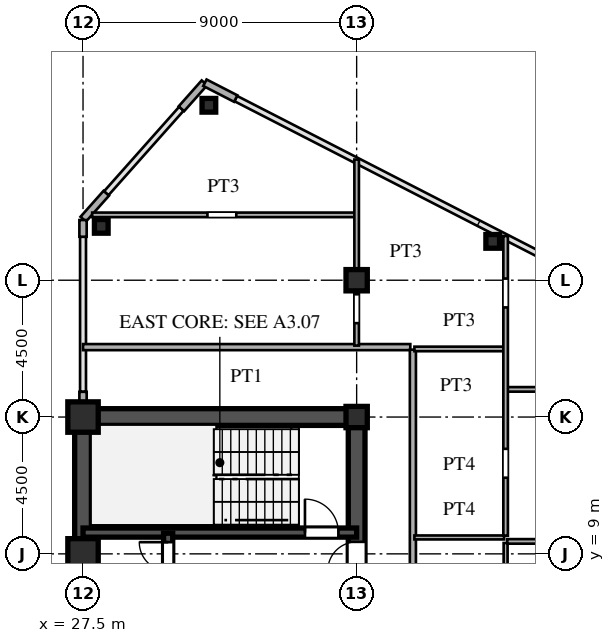
"""IFC4 building model, lengths in metres.
Left out: names, types, materials, properties, quantities, classifications, styles, units other than length and angle.
Written with IfcOpenShell. Run it as: python <this file> out.ifc"""

import sys

from ifc_helpers import new_model, si_unit, direction, frame, frame_2d, origin, origin_2d, place, context, subcontext, project, spatial, rectangle, hollow_rectangle, i_section, extrude, source, transform, mapped, element, fill, save


model = new_model("IFC4")
c1 = context("Model", 3, precision=1e-05, world=origin(), true_north=direction((0.0, 1.0)))
c2 = subcontext(c1, "Body", "Model", "MODEL_VIEW")
j1 = project(units=[si_unit("LENGTHUNIT", "METRE"), si_unit("PLANEANGLEUNIT", "RADIAN")], contexts=[c1])
p1 = place(None, origin())
s1 = spatial("IfcSite", under=j1, at=p1, CompositionType="ELEMENT")
p2 = place(p1, origin())
s2 = spatial("IfcBuilding", under=s1, at=p2, CompositionType="ELEMENT")
p3 = place(p2, frame((0.0, 0.0, 151.2)))
s3 = spatial("IfcBuildingStorey", under=s2, at=p3, CompositionType="ELEMENT", Elevation=151.2)
m1 = source(origin(), c2, "Body", "SweptSolid", [
    extrude(hollow_rectangle(XDim=1.0, YDim=1.0, WallThickness=0.042, at=origin_2d()), origin(), (0.0, 0.0, 1.0), 3.6),
])
for number, where, z_axis, x_axis in (
    (1, (27.5, 9.0, 0.0), (0.0, 0.0, 1.0), (1.0, 0.0, 0.0)),
    (2, (27.5, 13.5, 0.0), (0.0, 0.0, 1.0), (1.0, 0.0, 0.0)),
):
    element("IfcColumn", number, at=place(p3, frame(where, z_axis=z_axis, x_axis=x_axis)), inside=s3, PredefinedType="COLUMN", context=c2, shape_type="MappedRepresentation", body=[
        mapped(m1, transform((0.0, 0.0, 0.0), scale=1.0)),
    ])
m2 = source(origin(), c2, "Body", "SweptSolid", [
    extrude(i_section(OverallWidth=0.7, OverallDepth=0.7, WebThickness=0.028, FlangeThickness=0.045, at=origin_2d()), origin(), (0.0, 0.0, 1.0), 3.6),
])
for number, where, z_axis, x_axis in (
    (3, (36.5, 13.5, 0.0), (0.0, 0.0, 1.0), (1.0, 0.0, 0.0)),
    (4, (36.5, 18.0, 0.0), (0.0, 0.0, 1.0), (1.0, 0.0, 0.0)),
):
    element("IfcColumn", number, at=place(p3, frame(where, z_axis=z_axis, x_axis=x_axis)), inside=s3, PredefinedType="COLUMN", context=c2, shape_type="MappedRepresentation", body=[
        mapped(m2, transform((0.0, 0.0, 0.0), scale=1.0)),
    ])
m3 = source(origin(), c2, "Body", "SweptSolid", [
    extrude(hollow_rectangle(XDim=0.45, YDim=0.45, WallThickness=0.018, at=origin_2d()), origin(), (0.0, 0.0, 1.0), 3.6),
])
for number, where, z_axis, x_axis in (
    (5, (31.64, 23.754, 0.0), (0.0, 0.0, 1.0), (1.0, 0.0, 0.0)),
    (6, (28.1, 19.772, 0.0), (0.0, 0.0, 1.0), (1.0, 0.0, 0.0)),
    (7, (40.976, 19.278, 0.0), (0.0, 0.0, 1.0), (1.0, 0.0, 0.0)),
):
    element("IfcColumn", number, at=place(p3, frame(where, z_axis=z_axis, x_axis=x_axis)), inside=s3, PredefinedType="COLUMN", context=c2, shape_type="MappedRepresentation", body=[
        mapped(m3, transform((0.0, 0.0, 0.0), scale=1.0)),
    ])
p4 = place(p3, frame((32.523, 23.975, 0.0), z_axis=(0.0, 0.0, 1.0), x_axis=(-0.889797395748, 0.456355776255, 0.0)))
e8 = element("IfcWall", 8, at=p4, inside=s3, PredefinedType="SOLIDWALL", context=c2, shape_type="SweptSolid", body=[
    extrude(rectangle(XDim=1.14, YDim=0.24, at=frame_2d((0.57, 0.0))), origin(), (0.0, 0.0, 1.0), 3.38),
])
for number, where, z_axis, x_axis in (
    (9, (31.493, 24.492, 0.0), (0.0, 0.0, 1.0), (-0.664, -0.747, 0.0)),
    (10, (28.264, 20.86, 0.0), (0.0, 0.0, 1.0), (-0.664, -0.747, 0.0)),
):
    element("IfcWall", number, at=place(p3, frame(where, z_axis=z_axis, x_axis=x_axis)), inside=s3, PredefinedType="SOLIDWALL", context=c2, shape_type="SweptSolid", body=[
        extrude(rectangle(XDim=1.14, YDim=0.24, at=frame_2d((0.57, 0.0))), origin(), (0.0, 0.0, 1.0), 3.38),
    ])
p5 = place(p3, frame((27.5, 13.78, 0.0), z_axis=(0.0, 0.0, 1.0), x_axis=(0.0, 1.0, 0.0)))
e11 = element("IfcWall", 11, at=p5, inside=s3, PredefinedType="SOLIDWALL", context=c2, shape_type="SweptSolid", body=[
    extrude(rectangle(XDim=0.55, YDim=0.24, at=frame_2d((0.275, 0.0))), origin(), (0.0, 0.0, 1.0), 2.88),
])
p6 = place(p3, frame((27.5, 19.43, 0.0), z_axis=(0.0, 0.0, 1.0), x_axis=(0.0, 1.0, 0.0)))
e12 = element("IfcWall", 12, at=p6, inside=s3, PredefinedType="SOLIDWALL", context=c2, shape_type="SweptSolid", body=[
    extrude(rectangle(XDim=0.55, YDim=0.24, at=frame_2d((0.275, 0.0))), origin(), (0.0, 0.0, 1.0), 3.38),
])
p7 = place(p3, frame((27.5, 1.3, 0.0), z_axis=(0.0, 0.0, 1.0), x_axis=(0.0, 1.0, 0.0)))
e13 = element("IfcWall", 13, at=p7, inside=s3, PredefinedType="SHEAR", context=c2, shape_type="SweptSolid", body=[
    extrude(rectangle(XDim=12.2, YDim=0.55, at=frame_2d((6.1, 0.0))), origin(), (0.0, 0.0, 1.0), 3.38),
])
p8 = place(p3, frame((27.5, 13.5, 0.0), z_axis=(0.0, 0.0, 1.0), x_axis=(1.0, 0.0, 0.0)))
e14 = element("IfcWall", 14, at=p8, inside=s3, PredefinedType="SHEAR", context=c2, shape_type="SweptSolid", body=[
    extrude(rectangle(XDim=9.0, YDim=0.55, at=frame_2d((4.5, 0.0))), origin(), (0.0, 0.0, 1.0), 3.38),
])
p9 = place(p3, frame((36.5, 8.2, 0.0), z_axis=(0.0, 0.0, 1.0), x_axis=(0.0, 1.0, 0.0)))
e15 = element("IfcWall", 15, at=p9, inside=s3, PredefinedType="SHEAR", context=c2, shape_type="SweptSolid", body=[
    extrude(rectangle(XDim=5.45, YDim=0.55, at=frame_2d((2.725, 0.0))), origin(), (0.0, 0.0, 1.0), 3.38),
])
p10 = place(p9, frame((0.245, 0.0, 0.0)))
e16 = element("IfcOpeningElement", 16, at=p10, cuts=e15, PredefinedType="OPENING", context=c2, shape_type="SweptSolid", body=[
    extrude(rectangle(XDim=0.95, YDim=2.15, at=frame_2d((0.475, 1.075))), frame((0.0, 0.285, 0.0), z_axis=(0.0, -1.0, 0.0), x_axis=(1.0, 0.0, 0.0)), (0.0, 0.0, 1.0), 0.57),
])
p11 = place(p3, frame((27.5, 9.7, 0.0), z_axis=(0.0, 0.0, 1.0), x_axis=(1.0, 0.0, 0.0)))
e17 = element("IfcWall", 17, at=p11, inside=s3, PredefinedType="SHEAR", context=c2, shape_type="SweptSolid", body=[
    extrude(rectangle(XDim=9.0, YDim=0.3, at=frame_2d((4.5, 0.0))), origin(), (0.0, 0.0, 1.0), 3.38),
])
p12 = place(p11, frame((7.3, 0.0, 0.0)))
e18 = element("IfcOpeningElement", 18, at=p12, cuts=e17, PredefinedType="OPENING", context=c2, shape_type="SweptSolid", body=[
    extrude(rectangle(XDim=1.1, YDim=2.2, at=frame_2d((0.55, 1.1))), frame((0.0, 0.16, 0.0), z_axis=(0.0, -1.0, 0.0), x_axis=(1.0, 0.0, 0.0)), (0.0, 0.0, 1.0), 0.32),
])
p13 = place(p3, frame((30.3, 8.15, 0.0), z_axis=(0.0, 0.0, 1.0), x_axis=(0.0, 1.0, 0.0)))
e19 = element("IfcWall", 19, at=p13, inside=s3, PredefinedType="SHEAR", context=c2, shape_type="SweptSolid", body=[
    extrude(rectangle(XDim=1.53, YDim=0.3, at=frame_2d((0.765, 0.0))), origin(), (0.0, 0.0, 1.0), 3.38),
])
p14 = place(p13, frame((0.285, 0.0, 0.0)))
e20 = element("IfcOpeningElement", 20, at=p14, cuts=e19, PredefinedType="OPENING", context=c2, shape_type="SweptSolid", body=[
    extrude(rectangle(XDim=0.95, YDim=2.15, at=frame_2d((0.475, 1.075))), frame((0.0, 0.16, 0.0), z_axis=(0.0, -1.0, 0.0), x_axis=(1.0, 0.0, 0.0)), (0.0, 0.0, 1.0), 0.32),
])
p15 = place(p3, frame((41.45, 9.41, 0.0), z_axis=(0.0, 0.0, 1.0), x_axis=(1.0, 0.0, 0.0)))
e21 = element("IfcWall", 21, at=p15, inside=s3, PredefinedType="PARTITIONING", context=c2, shape_type="SweptSolid", body=[
    extrude(rectangle(XDim=18.7, YDim=0.15, at=frame_2d((9.35, 0.0))), origin(), (0.0, 0.0, 1.0), 3.38),
])
p16 = place(p15, frame((2.75, 0.0, 0.0)))
e22 = element("IfcOpeningElement", 22, at=p16, cuts=e21, PredefinedType="OPENING", context=c2, shape_type="SweptSolid", body=[
    extrude(rectangle(XDim=0.95, YDim=2.15, at=frame_2d((0.475, 1.075))), frame((0.0, 0.085, 0.0), z_axis=(0.0, -1.0, 0.0), x_axis=(1.0, 0.0, 0.0)), (0.0, 0.0, 1.0), 0.17),
])
p17 = place(p15, frame((15.425, 0.0, 0.0)))
e23 = element("IfcOpeningElement", 23, at=p17, cuts=e21, PredefinedType="OPENING", context=c2, shape_type="SweptSolid", body=[
    extrude(rectangle(XDim=0.95, YDim=2.15, at=frame_2d((0.475, 1.075))), frame((0.0, 0.085, 0.0), z_axis=(0.0, -1.0, 0.0), x_axis=(1.0, 0.0, 0.0)), (0.0, 0.0, 1.0), 0.17),
])
p18 = place(p15, frame((9.3, 0.0, 0.0)))
e24 = element("IfcOpeningElement", 24, at=p18, cuts=e21, PredefinedType="OPENING", context=c2, shape_type="SweptSolid", body=[
    extrude(rectangle(XDim=0.95, YDim=2.15, at=frame_2d((0.475, 1.075))), frame((0.0, 0.085, 0.0), z_axis=(0.0, -1.0, 0.0), x_axis=(1.0, 0.0, 0.0)), (0.0, 0.0, 1.0), 0.17),
])
p19 = place(p3, frame((38.4, 9.54, 0.0), z_axis=(0.0, 0.0, 1.0), x_axis=(1.0, 0.0, 0.0)))
e25 = element("IfcWall", 25, at=p19, inside=s3, PredefinedType="PARTITIONING", context=c2, shape_type="SweptSolid", body=[
    extrude(rectangle(XDim=2.95, YDim=0.13, at=frame_2d((1.475, 0.0))), origin(), (0.0, 0.0, 1.0), 3.38),
])
p20 = place(p3, frame((41.45, 14.41, 0.0), z_axis=(0.0, 0.0, 1.0), x_axis=(1.0, 0.0, 0.0)))
e26 = element("IfcWall", 26, at=p20, inside=s3, PredefinedType="PARTITIONING", context=c2, shape_type="SweptSolid", body=[
    extrude(rectangle(XDim=9.741, YDim=0.15, at=frame_2d((4.871, 0.0))), origin(), (0.0, 0.0, 1.0), 2.78),
])
p21 = place(p20, frame((7.628, 0.0, 0.0)))
e27 = element("IfcOpeningElement", 27, at=p21, cuts=e26, PredefinedType="OPENING", context=c2, shape_type="SweptSolid", body=[
    extrude(rectangle(XDim=0.95, YDim=2.15, at=frame_2d((0.475, 1.075))), frame((0.0, 0.085, 0.0), z_axis=(0.0, -1.0, 0.0), x_axis=(1.0, 0.0, 0.0)), (0.0, 0.0, 1.0), 0.17),
])
p22 = place(p3, frame((38.4, 15.74, 0.0), z_axis=(0.0, 0.0, 1.0), x_axis=(1.0, 0.0, 0.0)))
e28 = element("IfcWall", 28, at=p22, inside=s3, PredefinedType="PARTITIONING", context=c2, shape_type="SweptSolid", body=[
    extrude(rectangle(XDim=2.95, YDim=0.15, at=frame_2d((1.475, 0.0))), origin(), (0.0, 0.0, 1.0), 3.38),
])
p23 = place(p3, frame((27.5, 15.8, 0.0), z_axis=(0.0, 0.0, 1.0), x_axis=(1.0, 0.0, 0.0)))
e29 = element("IfcWall", 29, at=p23, inside=s3, PredefinedType="PARTITIONING", context=c2, shape_type="SweptSolid", body=[
    extrude(rectangle(XDim=10.765, YDim=0.2, at=frame_2d((5.382, 0.0))), origin(), (0.0, 0.0, 1.0), 3.38),
])
p24 = place(p3, frame((27.801, 20.15, 0.0), z_axis=(0.0, 0.0, 1.0), x_axis=(1.0, 0.0, 0.0)))
e30 = element("IfcWall", 30, at=p24, inside=s3, PredefinedType="PARTITIONING", context=c2, shape_type="SweptSolid", body=[
    extrude(rectangle(XDim=8.649, YDim=0.15, at=frame_2d((4.325, 0.0))), origin(), (0.0, 0.0, 1.0), 3.38),
])
p25 = place(p24, frame((3.791, 0.0, 0.0)))
e31 = element("IfcOpeningElement", 31, at=p25, cuts=e30, PredefinedType="OPENING", context=c2, shape_type="SweptSolid", body=[
    extrude(rectangle(XDim=0.95, YDim=2.15, at=frame_2d((0.475, 1.075))), frame((0.0, 0.085, 0.0), z_axis=(0.0, -1.0, 0.0), x_axis=(1.0, 0.0, 0.0)), (0.0, 0.0, 1.0), 0.17),
])
p26 = place(p3, frame((36.5, 15.85, 0.0), z_axis=(0.0, 0.0, 1.0), x_axis=(0.0, 1.0, 0.0)))
e32 = element("IfcWall", 32, at=p26, inside=s3, PredefinedType="PARTITIONING", context=c2, shape_type="SweptSolid", body=[
    extrude(rectangle(XDim=6.119, YDim=0.15, at=frame_2d((3.06, 0.0))), origin(), (0.0, 0.0, 1.0), 2.78),
])
p27 = place(p26, frame((0.738, 0.0, 0.0)))
e33 = element("IfcOpeningElement", 33, at=p27, cuts=e32, PredefinedType="OPENING", context=c2, shape_type="SweptSolid", body=[
    extrude(rectangle(XDim=0.95, YDim=2.15, at=frame_2d((0.475, 1.075))), frame((0.0, 0.085, 0.0), z_axis=(0.0, -1.0, 0.0), x_axis=(1.0, 0.0, 0.0)), (0.0, 0.0, 1.0), 0.17),
])
p28 = place(p3, frame((38.35, -15.715, 0.0), z_axis=(0.0, 0.0, 1.0), x_axis=(0.0, 1.0, 0.0)))
e34 = element("IfcWall", 34, at=p28, inside=s3, PredefinedType="PARTITIONING", context=c2, shape_type="SweptSolid", body=[
    extrude(rectangle(XDim=31.43, YDim=0.2, at=frame_2d((15.715, 0.0))), origin(), (0.0, 0.0, 1.0), 3.38),
])
p29 = place(p28, frame((2.99, 0.0, 0.0)))
e35 = element("IfcOpeningElement", 35, at=p29, cuts=e34, PredefinedType="OPENING", context=c2, shape_type="SweptSolid", body=[
    extrude(rectangle(XDim=1.05, YDim=2.25, at=frame_2d((0.525, 1.125))), frame((0.0, 0.11, 0.0), z_axis=(0.0, -1.0, 0.0), x_axis=(1.0, 0.0, 0.0)), (0.0, 0.0, 1.0), 0.22),
])
p30 = place(p28, frame((12.895, 0.0, 0.0)))
e36 = element("IfcOpeningElement", 36, at=p30, cuts=e34, PredefinedType="OPENING", context=c2, shape_type="SweptSolid", body=[
    extrude(rectangle(XDim=1.05, YDim=2.25, at=frame_2d((0.525, 1.125))), frame((0.0, 0.11, 0.0), z_axis=(0.0, -1.0, 0.0), x_axis=(1.0, 0.0, 0.0)), (0.0, 0.0, 1.0), 0.22),
])
p31 = place(p28, frame((20.988, 0.0, 0.0)))
e37 = element("IfcOpeningElement", 37, at=p31, cuts=e34, PredefinedType="OPENING", context=c2, shape_type="SweptSolid", body=[
    extrude(rectangle(XDim=1.05, YDim=2.25, at=frame_2d((0.525, 1.125))), frame((0.0, 0.11, 0.0), z_axis=(0.0, -1.0, 0.0), x_axis=(1.0, 0.0, 0.0)), (0.0, 0.0, 1.0), 0.22),
])
p32 = place(p3, frame((41.4, 0.552, 0.0), z_axis=(0.0, 0.0, 1.0), x_axis=(0.0, 1.0, 0.0)))
e38 = element("IfcWall", 38, at=p32, inside=s3, PredefinedType="PARTITIONING", context=c2, shape_type="SweptSolid", body=[
    extrude(rectangle(XDim=8.805, YDim=0.13, at=frame_2d((4.402, 0.0))), origin(), (0.0, 0.0, 1.0), 3.38),
])
p33 = place(p32, frame((4.771, 0.0, 0.0)))
e39 = element("IfcOpeningElement", 39, at=p33, cuts=e38, PredefinedType="OPENING", context=c2, shape_type="SweptSolid", body=[
    extrude(rectangle(XDim=0.95, YDim=2.15, at=frame_2d((0.475, 1.075))), frame((0.0, 0.075, 0.0), z_axis=(0.0, -1.0, 0.0), x_axis=(1.0, 0.0, 0.0)), (0.0, 0.0, 1.0), 0.15),
])
p34 = place(p3, frame((41.4, 9.595, 0.0), z_axis=(0.0, 0.0, 1.0), x_axis=(0.0, 1.0, 0.0)))
e40 = element("IfcWall", 40, at=p34, inside=s3, PredefinedType="PARTITIONING", context=c2, shape_type="SweptSolid", body=[
    extrude(rectangle(XDim=9.86, YDim=0.15, at=frame_2d((4.93, 0.0))), origin(), (0.0, 0.0, 1.0), 3.38),
])
p35 = place(p34, frame((1.909, 0.0, 0.0)))
e41 = element("IfcOpeningElement", 41, at=p35, cuts=e40, PredefinedType="OPENING", context=c2, shape_type="SweptSolid", body=[
    extrude(rectangle(XDim=0.95, YDim=2.15, at=frame_2d((0.475, 1.075))), frame((0.0, 0.085, 0.0), z_axis=(0.0, -1.0, 0.0), x_axis=(1.0, 0.0, 0.0)), (0.0, 0.0, 1.0), 0.17),
])
p36 = place(p34, frame((7.51, 0.0, 0.0)))
e42 = element("IfcOpeningElement", 42, at=p36, cuts=e40, PredefinedType="OPENING", context=c2, shape_type="SweptSolid", body=[
    extrude(rectangle(XDim=0.95, YDim=2.15, at=frame_2d((0.475, 1.075))), frame((0.0, 0.085, 0.0), z_axis=(0.0, -1.0, 0.0), x_axis=(1.0, 0.0, 0.0)), (0.0, 0.0, 1.0), 0.17),
])
m4 = source(origin(), c2, "Body", "SweptSolid", [
    extrude(rectangle(XDim=0.95, YDim=2.15, at=frame_2d((0.475, 1.075))), frame((0.0, 0.025, 0.0), z_axis=(0.0, -1.0, 0.0), x_axis=(1.0, 0.0, 0.0)), (0.0, 0.0, 1.0), 0.05),
])
p37 = place(p10, origin())
e43 = element("IfcDoor", 43, at=p37, inside=s3, OperationType="SINGLE_SWING_LEFT", PredefinedType="DOOR", context=c2, shape_type="MappedRepresentation", body=[
    mapped(m4, transform((0.0, 0.0, 0.0), scale=1.0)),
])
fill(e16, e43)
m5 = source(origin(), c2, "Body", "SweptSolid", [
    extrude(rectangle(XDim=1.1, YDim=2.2, at=frame_2d((0.55, 1.1))), frame((0.0, 0.025, 0.0), z_axis=(0.0, -1.0, 0.0), x_axis=(1.0, 0.0, 0.0)), (0.0, 0.0, 1.0), 0.05),
])
p38 = place(p12, origin())
e44 = element("IfcDoor", 44, at=p38, inside=s3, OperationType="SINGLE_SWING_LEFT", PredefinedType="DOOR", context=c2, shape_type="MappedRepresentation", body=[
    mapped(m5, transform((0.0, 0.0, 0.0), scale=1.0)),
])
fill(e18, e44)
p39 = place(p14, origin())
e45 = element("IfcDoor", 45, at=p39, inside=s3, OperationType="SINGLE_SWING_RIGHT", PredefinedType="DOOR", context=c2, shape_type="MappedRepresentation", body=[
    mapped(m4, transform((0.0, 0.0, 0.0), scale=1.0)),
])
fill(e20, e45)
save(model, sys.argv[1])
